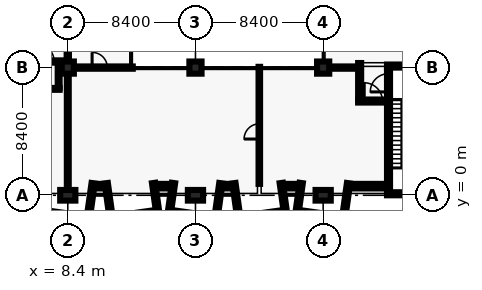
"""IFC4 building model, lengths in metres.
Left out: names, types, materials, properties, quantities, classifications, styles, units other than length and angle.
Written with IfcOpenShell. Run it as: python <this file> out.ifc"""

import sys

from ifc_helpers import new_model, si_unit, direction, frame, frame_2d, origin, origin_2d, place, context, subcontext, project, spatial, rectangle, extrude, element, fill, save


model = new_model("IFC4")
c1 = context("Model", 3, precision=1e-05, world=origin(), true_north=direction((0.0, 1.0)))
c2 = subcontext(c1, "Body", "Model", "MODEL_VIEW")
j1 = project(units=[si_unit("LENGTHUNIT", "METRE"), si_unit("PLANEANGLEUNIT", "RADIAN")], contexts=[c1])
p1 = place(None, origin())
s1 = spatial("IfcSite", under=j1, at=p1, CompositionType="ELEMENT")
p2 = place(p1, origin())
s2 = spatial("IfcBuilding", under=s1, at=p2, CompositionType="ELEMENT")
p3 = place(p2, frame((0.0, 0.0, 10.2)))
s3 = spatial("IfcBuildingStorey", under=s2, at=p3, CompositionType="ELEMENT", Elevation=10.2)
p4 = place(p3, frame((33.6, 0.1, 0.0), z_axis=(0.0, 0.0, 1.0), x_axis=(-1.0, 0.0, 0.0)))
e1 = element("IfcWall", 1, at=p4, inside=s3, PredefinedType="SHEAR", context=c2, shape_type="SweptSolid", body=[
    extrude(rectangle(XDim=4.2, YDim=0.2, at=frame_2d((2.1, 0.0))), origin(), (0.0, 0.0, 1.0), 4.8),
])
p5 = place(p3, frame((29.4, 8.5, 0.0), z_axis=(0.0, 0.0, 1.0), x_axis=(1.0, 0.0, 0.0)))
e2 = element("IfcWall", 2, at=p5, inside=s3, PredefinedType="SHEAR", context=c2, shape_type="SweptSolid", body=[
    extrude(rectangle(XDim=4.2, YDim=0.2, at=frame_2d((2.1, 0.0))), origin(), (0.0, 0.0, 1.0), 4.8),
])
p6 = place(p5, frame((1.5, 0.0, 0.0)))
e3 = element("IfcOpeningElement", 3, at=p6, cuts=e2, PredefinedType="OPENING", context=c2, shape_type="SweptSolid", body=[
    extrude(rectangle(XDim=1.2, YDim=2.1, at=frame_2d((0.6, 1.05))), frame((0.0, 0.11, 0.0), z_axis=(0.0, -1.0, 0.0), x_axis=(1.0, 0.0, 0.0)), (0.0, 0.0, 1.0), 0.22),
])
p7 = place(p3, frame((29.5, 0.2, 0.0), z_axis=(0.0, 0.0, 1.0), x_axis=(0.0, 1.0, 0.0)))
e4 = element("IfcWall", 4, at=p7, inside=s3, PredefinedType="SHEAR", context=c2, shape_type="SweptSolid", body=[
    extrude(rectangle(XDim=8.2, YDim=0.2, at=frame_2d((4.1, 0.0))), origin(), (0.0, 0.0, 1.0), 4.8),
])
p8 = place(p7, frame((6.6, 0.0, 0.0)))
e5 = element("IfcOpeningElement", 5, at=p8, cuts=e4, PredefinedType="OPENING", context=c2, shape_type="SweptSolid", body=[
    extrude(rectangle(XDim=1.2, YDim=2.1, at=frame_2d((0.6, 1.05))), frame((0.0, 0.11, 0.0), z_axis=(0.0, -1.0, 0.0), x_axis=(1.0, 0.0, 0.0)), (0.0, 0.0, 1.0), 0.22),
])
p9 = place(p3, frame((8.4, 0.0, 0.0), z_axis=(0.0, 0.0, 1.0), x_axis=(1.0, 0.0, 0.0)))
e6 = element("IfcColumn", 6, at=p9, inside=s3, PredefinedType="COLUMN", context=c2, shape_type="SweptSolid", body=[
    extrude(rectangle(XDim=1.0, YDim=0.7, at=origin_2d()), origin(), (0.0, 0.0, 1.0), 4.8),
])
p10 = place(p3, frame((8.4, 8.4, 0.0), z_axis=(0.0, 0.0, 1.0), x_axis=(1.0, 0.0, 0.0)))
e7 = element("IfcColumn", 7, at=p10, inside=s3, PredefinedType="COLUMN", context=c2, shape_type="SweptSolid", body=[
    extrude(rectangle(XDim=0.8, YDim=0.8, at=origin_2d()), origin(), (0.0, 0.0, 1.0), 4.8),
])
p11 = place(p3, frame((16.8, 0.0, 0.0), z_axis=(0.0, 0.0, 1.0), x_axis=(1.0, 0.0, 0.0)))
e8 = element("IfcColumn", 8, at=p11, inside=s3, PredefinedType="COLUMN", context=c2, shape_type="SweptSolid", body=[
    extrude(rectangle(XDim=1.0, YDim=0.7, at=origin_2d()), origin(), (0.0, 0.0, 1.0), 4.8),
])
p12 = place(p3, frame((16.8, 8.4, 0.0), z_axis=(0.0, 0.0, 1.0), x_axis=(1.0, 0.0, 0.0)))
e9 = element("IfcColumn", 9, at=p12, inside=s3, PredefinedType="COLUMN", context=c2, shape_type="SweptSolid", body=[
    extrude(rectangle(XDim=0.8, YDim=0.8, at=origin_2d()), origin(), (0.0, 0.0, 1.0), 4.8),
])
p13 = place(p3, frame((25.2, 0.0, 0.0), z_axis=(0.0, 0.0, 1.0), x_axis=(1.0, 0.0, 0.0)))
e10 = element("IfcColumn", 10, at=p13, inside=s3, PredefinedType="COLUMN", context=c2, shape_type="SweptSolid", body=[
    extrude(rectangle(XDim=1.0, YDim=0.7, at=origin_2d()), origin(), (0.0, 0.0, 1.0), 4.8),
])
p14 = place(p3, frame((25.2, 8.4, 0.0), z_axis=(0.0, 0.0, 1.0), x_axis=(1.0, 0.0, 0.0)))
e11 = element("IfcColumn", 11, at=p14, inside=s3, PredefinedType="COLUMN", context=c2, shape_type="SweptSolid", body=[
    extrude(rectangle(XDim=0.8, YDim=0.8, at=origin_2d()), origin(), (0.0, 0.0, 1.0), 4.8),
])
for number, where, z_axis, x_axis in (
    (12, (10.069, 0.795, 0.0), (0.0, 0.0, 1.0), (-0.139, -0.99, 0.0)),
    (13, (10.931, 0.795, 0.0), (0.0, 0.0, 1.0), (0.139, -0.99, 0.0)),
):
    element("IfcWall", number, at=place(p3, frame(where, z_axis=z_axis, x_axis=x_axis)), inside=s3, PredefinedType="SOLIDWALL", context=c2, shape_type="SweptSolid", body=[
        extrude(rectangle(XDim=2.219, YDim=0.215, at=frame_2d((1.11, 0.0))), origin(), (0.0, 0.0, 1.0), 4.5),
    ])
for number, where, z_axis, x_axis in (
    (14, (14.044, 0.809, 0.0), (0.0, 0.0, 1.0), (0.139, -0.99, 0.0)),
    (15, (15.356, 0.809, 0.0), (0.0, 0.0, 1.0), (-0.139, -0.99, 0.0)),
):
    element("IfcWall", number, at=place(p3, frame(where, z_axis=z_axis, x_axis=x_axis)), inside=s3, PredefinedType="SOLIDWALL", context=c2, shape_type="SweptSolid", body=[
        extrude(rectangle(XDim=1.8, YDim=0.215, at=frame_2d((0.9, 0.0))), origin(), (0.0, 0.0, 1.0), 4.5),
    ])
p15 = place(p3, frame((18.469, 0.795, 0.0), z_axis=(0.0, 0.0, 1.0), x_axis=(-0.139249775508, -0.99025728981, 0.0)))
e16 = element("IfcWall", 16, at=p15, inside=s3, PredefinedType="SOLIDWALL", context=c2, shape_type="SweptSolid", body=[
    extrude(rectangle(XDim=2.22, YDim=0.215, at=frame_2d((1.11, 0.0))), origin(), (0.0, 0.0, 1.0), 4.5),
])
p16 = place(p3, frame((19.331, 0.795, 0.0), z_axis=(0.0, 0.0, 1.0), x_axis=(0.139141913905, -0.990272451295, 0.0)))
e17 = element("IfcWall", 17, at=p16, inside=s3, PredefinedType="SOLIDWALL", context=c2, shape_type="SweptSolid", body=[
    extrude(rectangle(XDim=2.219, YDim=0.215, at=frame_2d((1.11, 0.0))), origin(), (0.0, 0.0, 1.0), 4.5),
])
for number, where, z_axis, x_axis in (
    (18, (22.444, 0.809, 0.0), (0.0, 0.0, 1.0), (0.139, -0.99, 0.0)),
    (19, (23.756, 0.809, 0.0), (0.0, 0.0, 1.0), (-0.139, -0.99, 0.0)),
):
    element("IfcWall", number, at=place(p3, frame(where, z_axis=z_axis, x_axis=x_axis)), inside=s3, PredefinedType="SOLIDWALL", context=c2, shape_type="SweptSolid", body=[
        extrude(rectangle(XDim=1.8, YDim=0.215, at=frame_2d((0.9, 0.0))), origin(), (0.0, 0.0, 1.0), 4.5),
    ])
p17 = place(p3, frame((26.869, 0.795, 0.0), z_axis=(0.0, 0.0, 1.0), x_axis=(-0.139141913905, -0.990272451295, 0.0)))
e20 = element("IfcWall", 20, at=p17, inside=s3, PredefinedType="SOLIDWALL", context=c2, shape_type="SweptSolid", body=[
    extrude(rectangle(XDim=2.219, YDim=0.215, at=frame_2d((1.11, 0.0))), origin(), (0.0, 0.0, 1.0), 4.5),
])
p18 = place(p3, frame((10.85, 0.6, 0.0), z_axis=(0.0, 0.0, 1.0), x_axis=(-1.0, 0.0, 0.0)))
e21 = element("IfcWall", 21, at=p18, inside=s3, PredefinedType="SOLIDWALL", context=c2, shape_type="SweptSolid", body=[
    extrude(rectangle(XDim=0.699, YDim=0.3, at=frame_2d((0.35, 0.0))), origin(), (0.0, 0.0, 1.0), 4.5),
])
p19 = place(p3, frame((15.218, 0.6, 0.0), z_axis=(0.0, 0.0, 1.0), x_axis=(-1.0, 0.0, 0.0)))
e22 = element("IfcWall", 22, at=p19, inside=s3, PredefinedType="SOLIDWALL", context=c2, shape_type="SweptSolid", body=[
    extrude(rectangle(XDim=1.036, YDim=0.3, at=frame_2d((0.518, 0.0))), origin(), (0.0, 0.0, 1.0), 4.5),
])
p20 = place(p3, frame((19.25, 0.6, 0.0), z_axis=(0.0, 0.0, 1.0), x_axis=(-1.0, 0.0, 0.0)))
e23 = element("IfcWall", 23, at=p20, inside=s3, PredefinedType="SOLIDWALL", context=c2, shape_type="SweptSolid", body=[
    extrude(rectangle(XDim=0.699, YDim=0.3, at=frame_2d((0.35, 0.0))), origin(), (0.0, 0.0, 1.0), 4.5),
])
p21 = place(p3, frame((23.618, 0.6, 0.0), z_axis=(0.0, 0.0, 1.0), x_axis=(-1.0, 0.0, 0.0)))
e24 = element("IfcWall", 24, at=p21, inside=s3, PredefinedType="SOLIDWALL", context=c2, shape_type="SweptSolid", body=[
    extrude(rectangle(XDim=1.036, YDim=0.3, at=frame_2d((0.518, 0.0))), origin(), (0.0, 0.0, 1.0), 4.5),
])
p22 = place(p3, frame((29.4, 0.6, 0.0), z_axis=(0.0, 0.0, 1.0), x_axis=(-1.0, 0.0, 0.0)))
e25 = element("IfcWall", 25, at=p22, inside=s3, PredefinedType="SOLIDWALL", context=c2, shape_type="SweptSolid", body=[
    extrude(rectangle(XDim=2.449, YDim=0.3, at=frame_2d((1.225, 0.0))), origin(), (0.0, 0.0, 1.0), 4.5),
])
p23 = place(p22, frame((0.775, 0.0, 0.9)))
e26 = element("IfcOpeningElement", 26, at=p23, cuts=e25, PredefinedType="OPENING", context=c2, shape_type="SweptSolid", body=[
    extrude(rectangle(XDim=1.2, YDim=1.5, at=frame_2d((0.6, 0.75))), frame((0.0, 0.16, 0.0), z_axis=(0.0, -1.0, 0.0), x_axis=(1.0, 0.0, 0.0)), (0.0, 0.0, 1.0), 0.32),
])
p24 = place(p3, frame((27.5, 6.2, 0.0), z_axis=(0.0, 0.0, 1.0), x_axis=(1.0, 0.0, 0.0)))
e27 = element("IfcWall", 27, at=p24, inside=s3, PredefinedType="SOLIDWALL", context=c2, shape_type="SweptSolid", body=[
    extrude(rectangle(XDim=1.9, YDim=0.2, at=frame_2d((0.95, 0.0))), origin(), (0.0, 0.0, 1.0), 4.5),
])
p25 = place(p24, frame((0.4, 0.0, 0.0)))
e28 = element("IfcOpeningElement", 28, at=p25, cuts=e27, PredefinedType="OPENING", context=c2, shape_type="SweptSolid", body=[
    extrude(rectangle(XDim=1.2, YDim=2.1, at=frame_2d((0.6, 1.05))), frame((0.0, 0.11, 0.0), z_axis=(0.0, -1.0, 0.0), x_axis=(1.0, 0.0, 0.0)), (0.0, 0.0, 1.0), 0.22),
])
p26 = place(p3, frame((27.6, 6.3, 0.0), z_axis=(0.0, 0.0, 1.0), x_axis=(0.0, 1.0, 0.0)))
e29 = element("IfcWall", 29, at=p26, inside=s3, PredefinedType="SOLIDWALL", context=c2, shape_type="SweptSolid", body=[
    extrude(rectangle(XDim=2.4, YDim=0.2, at=frame_2d((1.2, 0.0))), origin(), (0.0, 0.0, 1.0), 4.0),
])
p27 = place(p3, frame((8.325, 8.4, 0.0), z_axis=(0.0, 0.0, 1.0), x_axis=(1.0, 0.0, 0.0)))
e30 = element("IfcWall", 30, at=p27, inside=s3, PredefinedType="PARTITIONING", context=c2, shape_type="SweptSolid", body=[
    extrude(rectangle(XDim=4.35, YDim=0.15, at=frame_2d((2.175, 0.0))), origin(), (0.0, 0.0, 1.0), 3.8),
])
p28 = place(p27, frame((1.675, 0.0, 0.0)))
e31 = element("IfcOpeningElement", 31, at=p28, cuts=e30, PredefinedType="OPENING", context=c2, shape_type="SweptSolid", body=[
    extrude(rectangle(XDim=1.0, YDim=2.1, at=frame_2d((0.5, 1.05))), frame((0.0, 0.085, 0.0), z_axis=(0.0, -1.0, 0.0), x_axis=(1.0, 0.0, 0.0)), (0.0, 0.0, 1.0), 0.17),
])
p29 = place(p3, frame((25.125, 8.4, 0.0), z_axis=(0.0, 0.0, 1.0), x_axis=(1.0, 0.0, 0.0)))
e32 = element("IfcWall", 32, at=p29, inside=s3, PredefinedType="PARTITIONING", context=c2, shape_type="SweptSolid", body=[
    extrude(rectangle(XDim=2.375, YDim=0.15, at=frame_2d((1.188, 0.0))), origin(), (0.0, 0.0, 1.0), 3.8),
])
p30 = place(p3, frame((6.1, 8.8, 0.0), z_axis=(0.0, 0.0, 1.0), x_axis=(1.0, 0.0, 0.0)))
e33 = element("IfcWall", 33, at=p30, inside=s3, PredefinedType="SOLIDWALL", context=c2, shape_type="SweptSolid", body=[
    extrude(rectangle(XDim=2.375, YDim=0.15, at=frame_2d((1.188, 0.0))), origin(), (0.0, 0.0, 1.0), 3.8),
])
p31 = place(p30, frame((0.2, 0.0, 0.0)))
e34 = element("IfcOpeningElement", 34, at=p31, cuts=e33, PredefinedType="OPENING", context=c2, shape_type="SweptSolid", body=[
    extrude(rectangle(XDim=1.2, YDim=2.1, at=frame_2d((0.6, 1.05))), frame((0.0, 0.085, 0.0), z_axis=(0.0, -1.0, 0.0), x_axis=(1.0, 0.0, 0.0)), (0.0, 0.0, 1.0), 0.17),
])
p32 = place(p3, frame((8.4, 8.475, 0.0), z_axis=(0.0, 0.0, 1.0), x_axis=(0.0, 1.0, 0.0)))
e35 = element("IfcWall", 35, at=p32, inside=s3, PredefinedType="PARTITIONING", context=c2, shape_type="SweptSolid", body=[
    extrude(rectangle(XDim=0.25, YDim=0.15, at=frame_2d((0.125, 0.0))), origin(), (0.0, 0.0, 1.0), 3.8),
])
p33 = place(p3, frame((8.4, 8.875, 0.0), z_axis=(0.0, 0.0, 1.0), x_axis=(0.0, 1.0, 0.0)))
e36 = element("IfcWall", 36, at=p33, inside=s3, PredefinedType="SOLIDWALL", context=c2, shape_type="SweptSolid", body=[
    extrude(rectangle(XDim=2.85, YDim=0.15, at=frame_2d((1.425, 0.0))), origin(), (0.0, 0.0, 1.0), 3.8),
])
p34 = place(p3, frame((6.1, 7.0, 0.0), z_axis=(0.0, 0.0, 1.0), x_axis=(1.0, 0.0, 0.0)))
e37 = element("IfcWall", 37, at=p34, inside=s3, PredefinedType="PARTITIONING", context=c2, shape_type="SweptSolid", body=[
    extrude(rectangle(XDim=1.762, YDim=0.125, at=frame_2d((0.881, 0.0))), origin(), (0.0, 0.0, 1.0), 4.5),
])
p35 = place(p3, frame((7.8, 7.062, 0.0), z_axis=(0.0, 0.0, 1.0), x_axis=(0.0, 1.0, 0.0)))
e38 = element("IfcWall", 38, at=p35, inside=s3, PredefinedType="PARTITIONING", context=c2, shape_type="SweptSolid", body=[
    extrude(rectangle(XDim=1.663, YDim=0.125, at=frame_2d((0.831, 0.0))), origin(), (0.0, 0.0, 1.0), 4.0),
])
p36 = place(p3, frame((8.4, 0.75, 0.0), z_axis=(0.0, 0.0, 1.0), x_axis=(0.0, 1.0, 0.0)))
e39 = element("IfcWall", 39, at=p36, inside=s3, PredefinedType="PARTITIONING", context=c2, shape_type="SweptSolid", body=[
    extrude(rectangle(XDim=7.575, YDim=0.125, at=frame_2d((3.788, 0.0))), origin(), (0.0, 0.0, 1.0), 3.8),
])
p37 = place(p3, frame((21.0, 0.75, 0.0), z_axis=(0.0, 0.0, 1.0), x_axis=(0.0, 1.0, 0.0)))
e40 = element("IfcWall", 40, at=p37, inside=s3, PredefinedType="PARTITIONING", context=c2, shape_type="SweptSolid", body=[
    extrude(rectangle(XDim=7.7, YDim=0.1, at=frame_2d((3.85, 0.0))), origin(), (0.0, 0.0, 1.0), 3.8),
])
p38 = place(p37, frame((2.95, 0.0, 0.0)))
e41 = element("IfcOpeningElement", 41, at=p38, cuts=e40, PredefinedType="OPENING", context=c2, shape_type="SweptSolid", body=[
    extrude(rectangle(XDim=1.0, YDim=2.1, at=frame_2d((0.5, 1.05))), frame((0.0, 0.06, 0.0), z_axis=(0.0, -1.0, 0.0), x_axis=(1.0, 0.0, 0.0)), (0.0, 0.0, 1.0), 0.12),
])
p39 = place(p23, origin())
e42 = element("IfcWindow", 42, at=p39, inside=s3, PartitioningType="SINGLE_PANEL", PredefinedType="WINDOW", context=c2, shape_type="SweptSolid", body=[
    extrude(rectangle(XDim=1.2, YDim=1.5, at=frame_2d((0.6, 0.75))), frame((0.0, 0.03, 0.0), z_axis=(0.0, -1.0, 0.0), x_axis=(1.0, 0.0, 0.0)), (0.0, 0.0, 1.0), 0.06),
])
fill(e26, e42)
p40 = place(p8, origin())
e43 = element("IfcDoor", 43, at=p40, inside=s3, OperationType="SINGLE_SWING_RIGHT", PredefinedType="DOOR", context=c2, shape_type="SweptSolid", body=[
    extrude(rectangle(XDim=1.2, YDim=2.1, at=frame_2d((0.6, 1.05))), frame((0.0, 0.025, 0.0), z_axis=(0.0, -1.0, 0.0), x_axis=(1.0, 0.0, 0.0)), (0.0, 0.0, 1.0), 0.05),
])
fill(e5, e43)
p41 = place(p25, origin())
e44 = element("IfcDoor", 44, at=p41, inside=s3, OperationType="SINGLE_SWING_RIGHT", PredefinedType="DOOR", context=c2, shape_type="SweptSolid", body=[
    extrude(rectangle(XDim=1.2, YDim=2.1, at=frame_2d((0.6, 1.05))), frame((0.0, 0.025, 0.0), z_axis=(0.0, -1.0, 0.0), x_axis=(1.0, 0.0, 0.0)), (0.0, 0.0, 1.0), 0.05),
])
fill(e28, e44)
p42 = place(p38, origin())
e45 = element("IfcDoor", 45, at=p42, inside=s3, OperationType="SINGLE_SWING_RIGHT", PredefinedType="DOOR", context=c2, shape_type="SweptSolid", body=[
    extrude(rectangle(XDim=1.0, YDim=2.1, at=frame_2d((0.5, 1.05))), frame((0.0, 0.025, 0.0), z_axis=(0.0, -1.0, 0.0), x_axis=(1.0, 0.0, 0.0)), (0.0, 0.0, 1.0), 0.05),
])
fill(e41, e45)
p43 = place(p31, origin())
e46 = element("IfcDoor", 46, at=p43, inside=s3, OperationType="SINGLE_SWING_RIGHT", PredefinedType="DOOR", context=c2, shape_type="SweptSolid", body=[
    extrude(rectangle(XDim=1.2, YDim=2.1, at=frame_2d((0.6, 1.05))), frame((0.0, 0.025, 0.0), z_axis=(0.0, -1.0, 0.0), x_axis=(1.0, 0.0, 0.0)), (0.0, 0.0, 1.0), 0.05),
])
fill(e34, e46)
p44 = place(p28, origin())
e47 = element("IfcDoor", 47, at=p44, inside=s3, OperationType="SINGLE_SWING_RIGHT", PredefinedType="DOOR", context=c2, shape_type="SweptSolid", body=[
    extrude(rectangle(XDim=1.0, YDim=2.1, at=frame_2d((0.5, 1.05))), frame((0.0, 0.025, 0.0), z_axis=(0.0, -1.0, 0.0), x_axis=(1.0, 0.0, 0.0)), (0.0, 0.0, 1.0), 0.05),
])
fill(e31, e47)
save(model, sys.argv[1])
